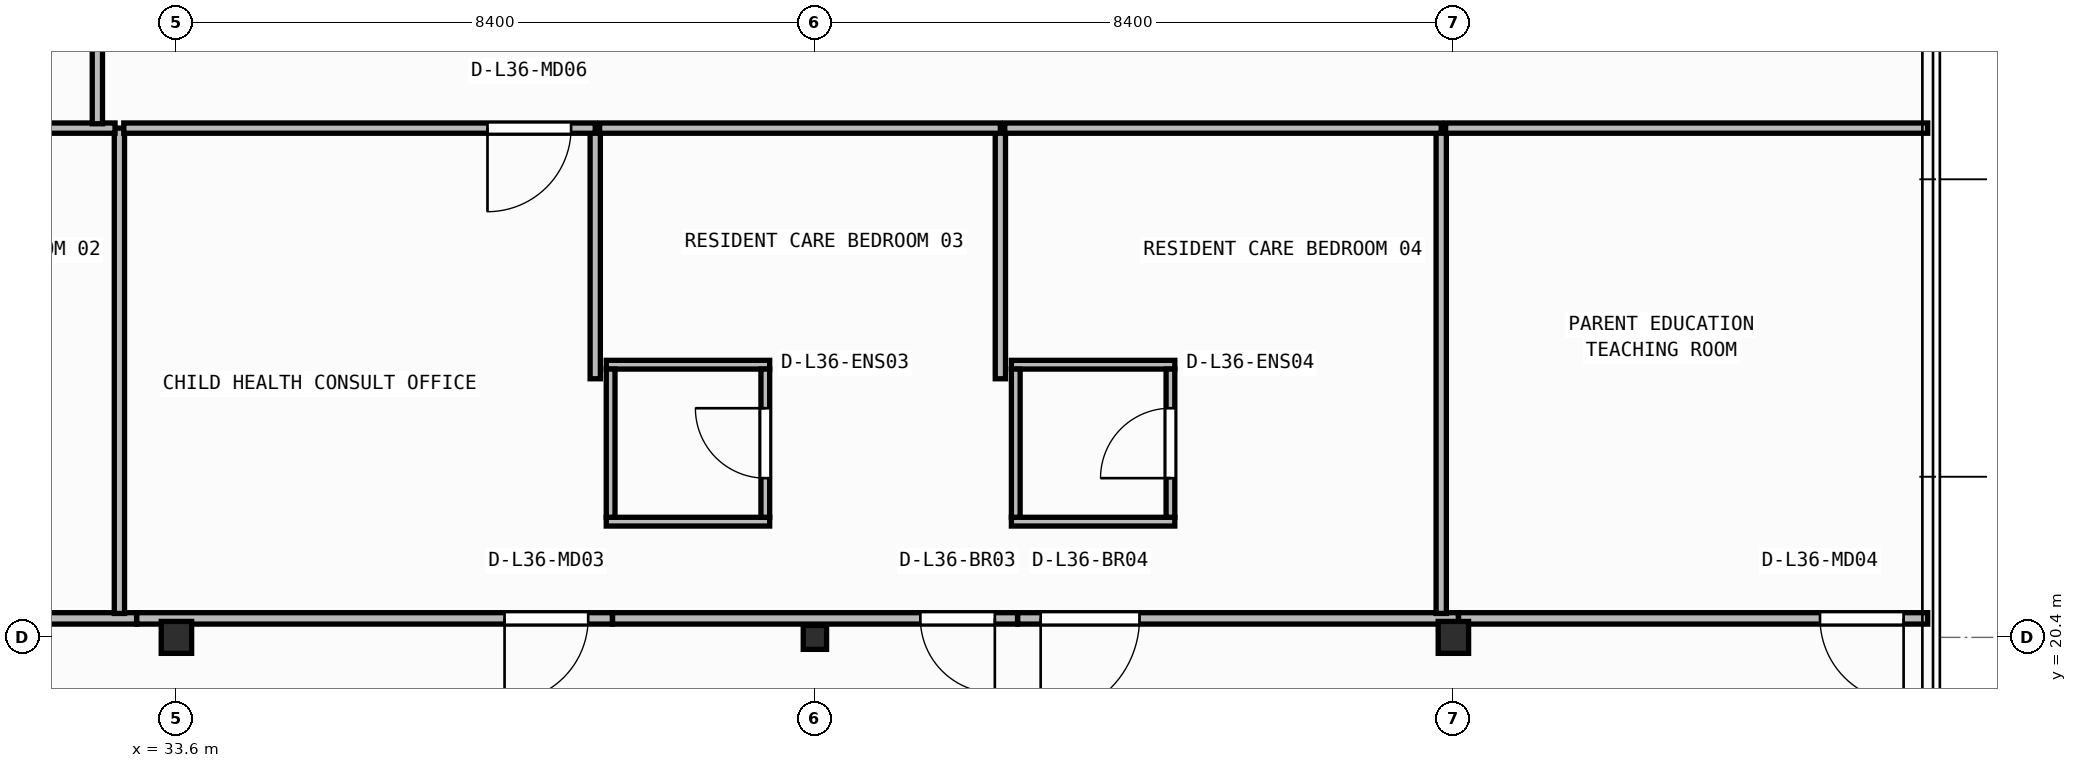
"""IFC4 building model, lengths in metres.
Left out: names, types, materials, properties, quantities, classifications, styles, units other than length and angle.
Written with IfcOpenShell. Run it as: python <this file> out.ifc"""

import sys

from ifc_helpers import new_model, si_unit, direction, frame, frame_2d, origin, origin_2d, place, context, subcontext, project, spatial, rectangle, i_section, extrude, element, fill, save


model = new_model("IFC4")
c1 = context("Model", 3, precision=1e-05, world=origin(), true_north=direction((0.0, 1.0)))
c2 = subcontext(c1, "Body", "Model", "MODEL_VIEW")
j1 = project(units=[si_unit("LENGTHUNIT", "METRE"), si_unit("PLANEANGLEUNIT", "RADIAN")], contexts=[c1])
p1 = place(None, origin())
s1 = spatial("IfcSite", under=j1, at=p1, CompositionType="ELEMENT")
p2 = place(p1, origin())
s2 = spatial("IfcBuilding", under=s1, at=p2, CompositionType="ELEMENT")
p3 = place(p2, frame((0.0, 0.0, 146.8)))
s3 = spatial("IfcBuildingStorey", under=s2, at=p3, CompositionType="ELEMENT", Elevation=146.8)
p4 = place(p3, frame((33.6, 20.4, 0.0), z_axis=(0.0, 0.0, 1.0), x_axis=(1.0, 0.0, 0.0)))
e1 = element("IfcColumn", 1, at=p4, inside=s3, PredefinedType="COLUMN", context=c2, shape_type="SweptSolid", body=[
    extrude(i_section(OverallWidth=0.4, OverallDepth=0.42, WebThickness=0.025, FlangeThickness=0.04, at=origin_2d()), origin(), (0.0, 0.0, 1.0), 3.95),
])
p5 = place(p3, frame((42.0, 20.4, 0.0), z_axis=(0.0, 0.0, 1.0), x_axis=(1.0, 0.0, 0.0)))
e2 = element("IfcColumn", 2, at=p5, inside=s3, PredefinedType="COLUMN", context=c2, shape_type="SweptSolid", body=[
    extrude(i_section(OverallWidth=0.307, OverallDepth=0.315, WebThickness=0.012, FlangeThickness=0.019, FilletRadius=0.017, at=origin_2d()), origin(), (0.0, 0.0, 1.0), 3.95),
])
p6 = place(p3, frame((50.4, 20.4, 0.0), z_axis=(0.0, 0.0, 1.0), x_axis=(1.0, 0.0, 0.0)))
e3 = element("IfcColumn", 3, at=p6, inside=s3, PredefinedType="COLUMN", context=c2, shape_type="SweptSolid", body=[
    extrude(i_section(OverallWidth=0.4, OverallDepth=0.42, WebThickness=0.025, FlangeThickness=0.04, at=origin_2d()), origin(), (0.0, 0.0, 1.0), 3.95),
])
for number, where, z_axis, x_axis in (
    (4, (39.255, 21.923, 0.0), (0.0, 0.0, 1.0), (1.0, 0.0, 0.0)),
    (5, (39.255, 23.988, 0.0), (0.0, 0.0, 1.0), (1.0, 0.0, 0.0)),
):
    element("IfcWall", number, at=place(p3, frame(where, z_axis=z_axis, x_axis=x_axis)), inside=s3, PredefinedType="PARTITIONING", context=c2, shape_type="SweptSolid", body=[
        extrude(rectangle(XDim=2.15, YDim=0.115, at=frame_2d((1.075, 0.0))), origin(), (0.0, 0.0, 1.0), 3.71),
    ])
p7 = place(p3, frame((39.312, 21.98, 0.0), z_axis=(0.0, 0.0, 1.0), x_axis=(0.0, 1.0, 0.0)))
e6 = element("IfcWall", 6, at=p7, inside=s3, PredefinedType="PARTITIONING", context=c2, shape_type="SweptSolid", body=[
    extrude(rectangle(XDim=1.95, YDim=0.115, at=frame_2d((0.975, 0.0))), origin(), (0.0, 0.0, 1.0), 3.71),
])
p8 = place(p3, frame((41.347, 21.98, 0.0), z_axis=(0.0, 0.0, 1.0), x_axis=(0.0, 1.0, 0.0)))
e7 = element("IfcWall", 7, at=p8, inside=s3, PredefinedType="PARTITIONING", context=c2, shape_type="SweptSolid", body=[
    extrude(rectangle(XDim=1.95, YDim=0.115, at=frame_2d((0.975, 0.0))), origin(), (0.0, 0.0, 1.0), 3.71),
])
p9 = place(p8, frame((0.515, 0.0, 0.0)))
e8 = element("IfcOpeningElement", 8, at=p9, cuts=e7, PredefinedType="OPENING", context=c2, shape_type="SweptSolid", body=[
    extrude(rectangle(XDim=0.92, YDim=2.1, at=frame_2d((0.46, 1.05))), frame((0.0, 0.067, 0.0), z_axis=(0.0, -1.0, 0.0), x_axis=(1.0, 0.0, 0.0)), (0.0, 0.0, 1.0), 0.135),
])
for number, where, z_axis, x_axis in (
    (9, (44.585, 21.923, 0.0), (0.0, 0.0, 1.0), (1.0, 0.0, 0.0)),
    (10, (44.585, 23.988, 0.0), (0.0, 0.0, 1.0), (1.0, 0.0, 0.0)),
):
    element("IfcWall", number, at=place(p3, frame(where, z_axis=z_axis, x_axis=x_axis)), inside=s3, PredefinedType="PARTITIONING", context=c2, shape_type="SweptSolid", body=[
        extrude(rectangle(XDim=2.15, YDim=0.115, at=frame_2d((1.075, 0.0))), origin(), (0.0, 0.0, 1.0), 3.71),
    ])
p10 = place(p3, frame((44.643, 21.98, 0.0), z_axis=(0.0, 0.0, 1.0), x_axis=(0.0, 1.0, 0.0)))
e11 = element("IfcWall", 11, at=p10, inside=s3, PredefinedType="PARTITIONING", context=c2, shape_type="SweptSolid", body=[
    extrude(rectangle(XDim=1.95, YDim=0.115, at=frame_2d((0.975, 0.0))), origin(), (0.0, 0.0, 1.0), 3.71),
])
p11 = place(p3, frame((46.677, 21.98, 0.0), z_axis=(0.0, 0.0, 1.0), x_axis=(0.0, 1.0, 0.0)))
e12 = element("IfcWall", 12, at=p11, inside=s3, PredefinedType="PARTITIONING", context=c2, shape_type="SweptSolid", body=[
    extrude(rectangle(XDim=1.95, YDim=0.115, at=frame_2d((0.975, 0.0))), origin(), (0.0, 0.0, 1.0), 3.71),
])
p12 = place(p11, frame((0.515, 0.0, 0.0)))
e13 = element("IfcOpeningElement", 13, at=p12, cuts=e12, PredefinedType="OPENING", context=c2, shape_type="SweptSolid", body=[
    extrude(rectangle(XDim=0.92, YDim=2.1, at=frame_2d((0.46, 1.05))), frame((0.0, 0.067, 0.0), z_axis=(0.0, -1.0, 0.0), x_axis=(1.0, 0.0, 0.0)), (0.0, 0.0, 1.0), 0.135),
])
p13 = place(p3, frame((33.076, 20.65, 0.0), z_axis=(0.0, 0.0, 1.0), x_axis=(-1.0, 0.0, 0.0)))
e14 = element("IfcWall", 14, at=p13, inside=s3, PredefinedType="PARTITIONING", context=c2, shape_type="SweptSolid", body=[
    extrude(rectangle(XDim=5.798, YDim=0.15, at=frame_2d((2.899, 0.0))), origin(), (0.0, 0.0, 1.0), 3.083),
])
p14 = place(p13, frame((3.069, 0.0, 0.0)))
e15 = element("IfcOpeningElement", 15, at=p14, cuts=e14, PredefinedType="OPENING", context=c2, shape_type="SweptSolid", body=[
    extrude(rectangle(XDim=1.3, YDim=2.15, at=frame_2d((0.65, 1.075))), frame((0.0, 0.085, 0.0), z_axis=(0.0, -1.0, 0.0), x_axis=(1.0, 0.0, 0.0)), (0.0, 0.0, 1.0), 0.17),
])
p15 = place(p3, frame((39.336, 20.65, 0.0), z_axis=(0.0, 0.0, 1.0), x_axis=(-1.0, 0.0, 0.0)))
e16 = element("IfcWall", 16, at=p15, inside=s3, PredefinedType="PARTITIONING", context=c2, shape_type="SweptSolid", body=[
    extrude(rectangle(XDim=6.258, YDim=0.15, at=frame_2d((3.129, 0.0))), origin(), (0.0, 0.0, 1.0), 3.083),
])
p16 = place(p15, frame((0.319, 0.0, 0.0)))
e17 = element("IfcOpeningElement", 17, at=p16, cuts=e16, PredefinedType="OPENING", context=c2, shape_type="SweptSolid", body=[
    extrude(rectangle(XDim=1.1, YDim=2.1, at=frame_2d((0.55, 1.05))), frame((0.0, 0.085, 0.0), z_axis=(0.0, -1.0, 0.0), x_axis=(1.0, 0.0, 0.0)), (0.0, 0.0, 1.0), 0.17),
])
p17 = place(p3, frame((44.666, 20.65, 0.0), z_axis=(0.0, 0.0, 1.0), x_axis=(-1.0, 0.0, 0.0)))
e18 = element("IfcWall", 18, at=p17, inside=s3, PredefinedType="PARTITIONING", context=c2, shape_type="SweptSolid", body=[
    extrude(rectangle(XDim=5.328, YDim=0.15, at=frame_2d((2.664, 0.0))), origin(), (0.0, 0.0, 1.0), 3.083),
])
p18 = place(p17, frame((0.299, 0.0, 0.0)))
e19 = element("IfcOpeningElement", 19, at=p18, cuts=e18, PredefinedType="OPENING", context=c2, shape_type="SweptSolid", body=[
    extrude(rectangle(XDim=0.98, YDim=2.1, at=frame_2d((0.49, 1.05))), frame((0.0, 0.085, 0.0), z_axis=(0.0, -1.0, 0.0), x_axis=(1.0, 0.0, 0.0)), (0.0, 0.0, 1.0), 0.17),
])
p19 = place(p3, frame((50.466, 20.65, 0.0), z_axis=(0.0, 0.0, 1.0), x_axis=(-1.0, 0.0, 0.0)))
e20 = element("IfcWall", 20, at=p19, inside=s3, PredefinedType="PARTITIONING", context=c2, shape_type="SweptSolid", body=[
    extrude(rectangle(XDim=5.798, YDim=0.15, at=frame_2d((2.899, 0.0))), origin(), (0.0, 0.0, 1.0), 3.083),
])
p20 = place(p19, frame((4.196, 0.0, 0.0)))
e21 = element("IfcOpeningElement", 21, at=p20, cuts=e20, PredefinedType="OPENING", context=c2, shape_type="SweptSolid", body=[
    extrude(rectangle(XDim=1.3, YDim=2.15, at=frame_2d((0.65, 1.075))), frame((0.0, 0.085, 0.0), z_axis=(0.0, -1.0, 0.0), x_axis=(1.0, 0.0, 0.0)), (0.0, 0.0, 1.0), 0.17),
])
p21 = place(p3, frame((56.64, 20.65, 0.0), z_axis=(0.0, 0.0, 1.0), x_axis=(-1.0, 0.0, 0.0)))
e22 = element("IfcWall", 22, at=p21, inside=s3, PredefinedType="PARTITIONING", context=c2, shape_type="SweptSolid", body=[
    extrude(rectangle(XDim=6.172, YDim=0.15, at=frame_2d((3.086, 0.0))), origin(), (0.0, 0.0, 1.0), 3.71),
])
p22 = place(p21, frame((0.317, 0.0, 0.0)))
e23 = element("IfcOpeningElement", 23, at=p22, cuts=e22, PredefinedType="OPENING", context=c2, shape_type="SweptSolid", body=[
    extrude(rectangle(XDim=1.1, YDim=2.1, at=frame_2d((0.55, 1.05))), frame((0.0, 0.085, 0.0), z_axis=(0.0, -1.0, 0.0), x_axis=(1.0, 0.0, 0.0)), (0.0, 0.0, 1.0), 0.17),
])
p23 = place(p3, frame((32.85, 20.715, 0.0), z_axis=(0.0, 0.0, 1.0), x_axis=(0.0, 1.0, 0.0)))
e24 = element("IfcWall", 24, at=p23, inside=s3, PredefinedType="PARTITIONING", context=c2, shape_type="SweptSolid", body=[
    extrude(rectangle(XDim=6.385, YDim=0.135, at=frame_2d((3.192, 0.0))), origin(), (0.0, 0.0, 1.0), 3.71),
])
p24 = place(p3, frame((32.792, 27.1, 0.0), z_axis=(0.0, 0.0, 1.0), x_axis=(-1.0, 0.0, 0.0)))
e25 = element("IfcWall", 25, at=p24, inside=s3, PredefinedType="PARTITIONING", context=c2, shape_type="SweptSolid", body=[
    extrude(rectangle(XDim=5.685, YDim=0.135, at=frame_2d((2.843, 0.0))), origin(), (0.0, 0.0, 1.0), 3.71),
])
p25 = place(p3, frame((39.11, 23.802, 0.0), z_axis=(0.0, 0.0, 1.0), x_axis=(0.0, 1.0, 0.0)))
e26 = element("IfcWall", 26, at=p25, inside=s3, PredefinedType="PARTITIONING", context=c2, shape_type="SweptSolid", body=[
    extrude(rectangle(XDim=3.298, YDim=0.135, at=frame_2d((1.649, 0.0))), origin(), (0.0, 0.0, 1.0), 3.71),
])
p26 = place(p3, frame((39.11, 27.1, 0.0), z_axis=(0.0, 0.0, 1.0), x_axis=(-1.0, 0.0, 0.0)))
e27 = element("IfcWall", 27, at=p26, inside=s3, PredefinedType="PARTITIONING", context=c2, shape_type="SweptSolid", body=[
    extrude(rectangle(XDim=6.203, YDim=0.135, at=frame_2d((3.101, 0.0))), origin(), (0.0, 0.0, 1.0), 3.71),
])
p27 = place(p26, frame((0.318, 0.0, 0.0)))
e28 = element("IfcOpeningElement", 28, at=p27, cuts=e27, PredefinedType="OPENING", context=c2, shape_type="SweptSolid", body=[
    extrude(rectangle(XDim=1.1, YDim=2.1, at=frame_2d((0.55, 1.05))), frame((0.0, 0.077, 0.0), z_axis=(0.0, -1.0, 0.0), x_axis=(1.0, 0.0, 0.0)), (0.0, 0.0, 1.0), 0.155),
])
p28 = place(p3, frame((44.44, 23.802, 0.0), z_axis=(0.0, 0.0, 1.0), x_axis=(0.0, 1.0, 0.0)))
e29 = element("IfcWall", 29, at=p28, inside=s3, PredefinedType="PARTITIONING", context=c2, shape_type="SweptSolid", body=[
    extrude(rectangle(XDim=3.298, YDim=0.135, at=frame_2d((1.649, 0.0))), origin(), (0.0, 0.0, 1.0), 3.71),
])
p29 = place(p3, frame((44.44, 27.1, 0.0), z_axis=(0.0, 0.0, 1.0), x_axis=(-1.0, 0.0, 0.0)))
e30 = element("IfcWall", 30, at=p29, inside=s3, PredefinedType="PARTITIONING", context=c2, shape_type="SweptSolid", body=[
    extrude(rectangle(XDim=5.272, YDim=0.135, at=frame_2d((2.636, 0.0))), origin(), (0.0, 0.0, 1.0), 3.71),
])
p30 = place(p3, frame((50.24, 20.715, 0.0), z_axis=(0.0, 0.0, 1.0), x_axis=(0.0, 1.0, 0.0)))
e31 = element("IfcWall", 31, at=p30, inside=s3, PredefinedType="PARTITIONING", context=c2, shape_type="SweptSolid", body=[
    extrude(rectangle(XDim=6.385, YDim=0.135, at=frame_2d((3.192, 0.0))), origin(), (0.0, 0.0, 1.0), 3.152),
])
p31 = place(p3, frame((50.24, 27.1, 0.0), z_axis=(0.0, 0.0, 1.0), x_axis=(-1.0, 0.0, 0.0)))
e32 = element("IfcWall", 32, at=p31, inside=s3, PredefinedType="PARTITIONING", context=c2, shape_type="SweptSolid", body=[
    extrude(rectangle(XDim=5.742, YDim=0.135, at=frame_2d((2.871, 0.0))), origin(), (0.0, 0.0, 1.0), 3.71),
])
p32 = place(p3, frame((56.64, 27.1, 0.0), z_axis=(0.0, 0.0, 1.0), x_axis=(-1.0, 0.0, 0.0)))
e33 = element("IfcWall", 33, at=p32, inside=s3, PredefinedType="PARTITIONING", context=c2, shape_type="SweptSolid", body=[
    extrude(rectangle(XDim=6.342, YDim=0.135, at=frame_2d((3.171, 0.0))), origin(), (0.0, 0.0, 1.0), 3.71),
])
p33 = place(p3, frame((32.56, 27.157, 0.0), z_axis=(0.0, 0.0, 1.0), x_axis=(0.0, 1.0, 0.0)))
e34 = element("IfcWall", 34, at=p33, inside=s3, PredefinedType="PARTITIONING", context=c2, shape_type="SweptSolid", body=[
    extrude(rectangle(XDim=4.166, YDim=0.135, at=frame_2d((2.083, 0.0))), origin(), (0.0, 0.0, 1.0), 3.71),
])
p34 = place(p9, origin())
e35 = element("IfcDoor", 35, at=p34, inside=s3, OperationType="SINGLE_SWING_RIGHT", PredefinedType="DOOR", context=c2, shape_type="SweptSolid", body=[
    extrude(rectangle(XDim=0.92, YDim=2.1, at=frame_2d((0.46, 1.05))), frame((0.0, 0.025, 0.0), z_axis=(0.0, -1.0, 0.0), x_axis=(1.0, 0.0, 0.0)), (0.0, 0.0, 1.0), 0.05),
])
fill(e8, e35)
p35 = place(p12, origin())
e36 = element("IfcDoor", 36, at=p35, inside=s3, OperationType="SINGLE_SWING_LEFT", PredefinedType="DOOR", context=c2, shape_type="SweptSolid", body=[
    extrude(rectangle(XDim=0.92, YDim=2.1, at=frame_2d((0.46, 1.05))), frame((0.0, 0.025, 0.0), z_axis=(0.0, -1.0, 0.0), x_axis=(1.0, 0.0, 0.0)), (0.0, 0.0, 1.0), 0.05),
])
fill(e13, e36)
p36 = place(p16, origin())
e37 = element("IfcDoor", 37, at=p36, inside=s3, OperationType="SINGLE_SWING_RIGHT", PredefinedType="DOOR", context=c2, shape_type="SweptSolid", body=[
    extrude(rectangle(XDim=1.1, YDim=2.1, at=frame_2d((0.55, 1.05))), frame((0.0, 0.025, 0.0), z_axis=(0.0, -1.0, 0.0), x_axis=(1.0, 0.0, 0.0)), (0.0, 0.0, 1.0), 0.05),
])
fill(e17, e37)
p37 = place(p18, origin())
e38 = element("IfcDoor", 38, at=p37, inside=s3, OperationType="SINGLE_SWING_LEFT", PredefinedType="DOOR", context=c2, shape_type="SweptSolid", body=[
    extrude(rectangle(XDim=0.98, YDim=2.1, at=frame_2d((0.49, 1.05))), frame((0.0, 0.025, 0.0), z_axis=(0.0, -1.0, 0.0), x_axis=(1.0, 0.0, 0.0)), (0.0, 0.0, 1.0), 0.05),
])
fill(e19, e38)
p38 = place(p20, origin())
e39 = element("IfcDoor", 39, at=p38, inside=s3, OperationType="SINGLE_SWING_RIGHT", PredefinedType="DOOR", context=c2, shape_type="SweptSolid", body=[
    extrude(rectangle(XDim=1.3, YDim=2.15, at=frame_2d((0.65, 1.075))), frame((0.0, 0.025, 0.0), z_axis=(0.0, -1.0, 0.0), x_axis=(1.0, 0.0, 0.0)), (0.0, 0.0, 1.0), 0.05),
])
fill(e21, e39)
p39 = place(p22, origin())
e40 = element("IfcDoor", 40, at=p39, inside=s3, OperationType="SINGLE_SWING_LEFT", PredefinedType="DOOR", context=c2, shape_type="SweptSolid", body=[
    extrude(rectangle(XDim=1.1, YDim=2.1, at=frame_2d((0.55, 1.05))), frame((0.0, 0.025, 0.0), z_axis=(0.0, -1.0, 0.0), x_axis=(1.0, 0.0, 0.0)), (0.0, 0.0, 1.0), 0.05),
])
fill(e23, e40)
p40 = place(p27, origin())
e41 = element("IfcDoor", 41, at=p40, inside=s3, OperationType="SINGLE_SWING_RIGHT", PredefinedType="DOOR", context=c2, shape_type="SweptSolid", body=[
    extrude(rectangle(XDim=1.1, YDim=2.1, at=frame_2d((0.55, 1.05))), frame((0.0, 0.025, 0.0), z_axis=(0.0, -1.0, 0.0), x_axis=(1.0, 0.0, 0.0)), (0.0, 0.0, 1.0), 0.05),
])
fill(e28, e41)
save(model, sys.argv[1])
